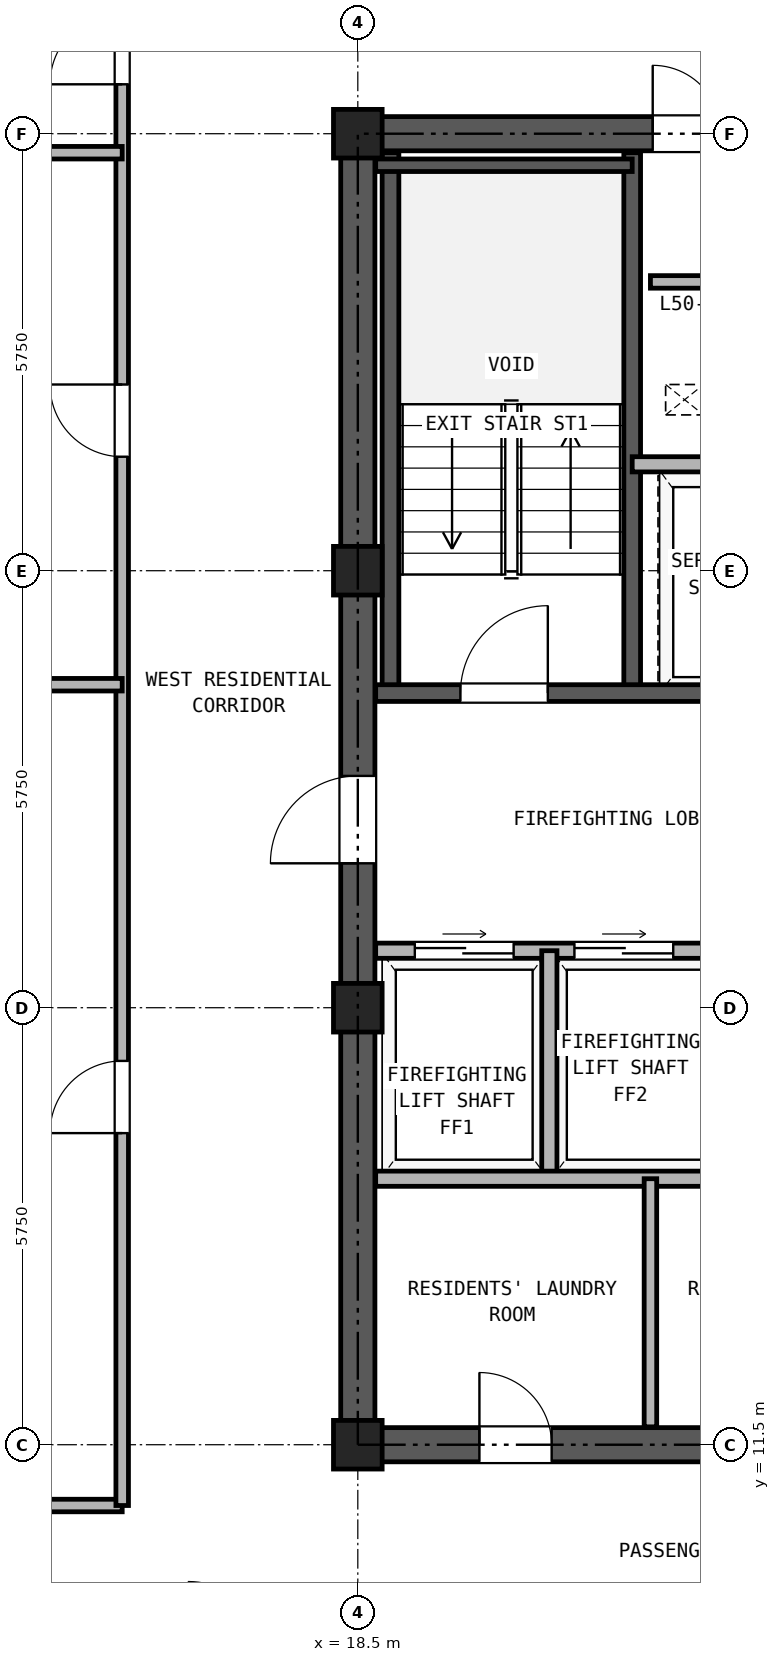
"""IFC4 building model, lengths in metres.
Left out: names, types, materials, properties, quantities, classifications, styles, units other than length and angle.
Written with IfcOpenShell. Run it as: python <this file> out.ifc"""

import sys

from ifc_helpers import new_model, si_unit, direction, frame, frame_2d, origin, origin_2d, place, context, subcontext, project, spatial, rectangle, hollow_rectangle, extrude, source, transform, mapped, element, fill, save


model = new_model("IFC4")
c1 = context("Model", 3, precision=1e-05, world=origin(), true_north=direction((0.0, 1.0)))
c2 = subcontext(c1, "Body", "Model", "MODEL_VIEW")
j1 = project(units=[si_unit("LENGTHUNIT", "METRE"), si_unit("PLANEANGLEUNIT", "RADIAN")], contexts=[c1])
p1 = place(None, origin())
s1 = spatial("IfcSite", under=j1, at=p1, CompositionType="ELEMENT")
p2 = place(p1, origin())
s2 = spatial("IfcBuilding", under=s1, at=p2, CompositionType="ELEMENT")
p3 = place(p2, frame((0.0, 0.0, 178.5)))
s3 = spatial("IfcBuildingStorey", under=s2, at=p3, CompositionType="ELEMENT", Elevation=178.5)
m1 = source(origin(), c2, "Body", "SweptSolid", [
    extrude(hollow_rectangle(XDim=0.64, YDim=0.64, WallThickness=0.035, at=origin_2d()), origin(), (0.0, 0.0, 1.0), 2.95),
])
for number, where, z_axis, x_axis in (
    (1, (18.5, 11.5, 0.0), (0.0, 0.0, 1.0), (1.0, 0.0, 0.0)),
    (2, (18.5, 17.25, 0.0), (0.0, 0.0, 1.0), (1.0, 0.0, 0.0)),
    (3, (18.5, 23.0, 0.0), (0.0, 0.0, 1.0), (1.0, 0.0, 0.0)),
    (4, (18.5, 28.75, 0.0), (0.0, 0.0, 1.0), (1.0, 0.0, 0.0)),
):
    element("IfcColumn", number, at=place(p3, frame(where, z_axis=z_axis, x_axis=x_axis)), inside=s3, PredefinedType="COLUMN", context=c2, shape_type="MappedRepresentation", body=[
        mapped(m1, transform((0.0, 0.0, 0.0), x_axis=(1.0, 0.0, 0.0), y_axis=(0.0, 1.0, 0.0), z_axis=(0.0, 0.0, 1.0), scale=1.0)),
    ])
p4 = place(p3, frame((18.275, 11.5, 0.0), z_axis=(0.0, 0.0, 1.0), x_axis=(1.0, 0.0, 0.0)))
e5 = element("IfcWall", 5, at=p4, inside=s3, PredefinedType="SHEAR", context=c2, shape_type="SweptSolid", body=[
    extrude(rectangle(XDim=10.45, YDim=0.45, at=frame_2d((5.225, 0.0))), origin(), (0.0, 0.0, 1.0), 2.95),
])
p5 = place(p4, frame((1.825, 0.0, 0.0)))
e6 = element("IfcOpeningElement", 6, at=p5, cuts=e5, PredefinedType="OPENING", context=c2, shape_type="SweptSolid", body=[
    extrude(rectangle(XDim=0.95, YDim=2.15, at=frame_2d((0.475, 1.075))), frame((0.0, 0.235, 0.0), z_axis=(0.0, -1.0, 0.0), x_axis=(1.0, 0.0, 0.0)), (0.0, 0.0, 1.0), 0.47),
])
p6 = place(p4, frame((5.325, 0.0, 0.0)))
e7 = element("IfcOpeningElement", 7, at=p6, cuts=e5, PredefinedType="OPENING", context=c2, shape_type="SweptSolid", body=[
    extrude(rectangle(XDim=0.95, YDim=2.15, at=frame_2d((0.475, 1.075))), frame((0.0, 0.235, 0.0), z_axis=(0.0, -1.0, 0.0), x_axis=(1.0, 0.0, 0.0)), (0.0, 0.0, 1.0), 0.47),
])
p7 = place(p4, frame((8.225, 0.0, 0.0)))
e8 = element("IfcOpeningElement", 8, at=p7, cuts=e5, PredefinedType="OPENING", context=c2, shape_type="SweptSolid", body=[
    extrude(rectangle(XDim=1.1, YDim=2.25, at=frame_2d((0.55, 1.125))), frame((0.0, 0.235, 0.0), z_axis=(0.0, -1.0, 0.0), x_axis=(1.0, 0.0, 0.0)), (0.0, 0.0, 1.0), 0.47),
])
p8 = place(p3, frame((18.275, 28.75, 0.0), z_axis=(0.0, 0.0, 1.0), x_axis=(1.0, 0.0, 0.0)))
e9 = element("IfcWall", 9, at=p8, inside=s3, PredefinedType="SHEAR", context=c2, shape_type="SweptSolid", body=[
    extrude(rectangle(XDim=10.45, YDim=0.45, at=frame_2d((5.225, 0.0))), origin(), (0.0, 0.0, 1.0), 2.95),
])
p9 = place(p8, frame((4.105, 0.0, 0.0)))
e10 = element("IfcOpeningElement", 10, at=p9, cuts=e9, PredefinedType="OPENING", context=c2, shape_type="SweptSolid", body=[
    extrude(rectangle(XDim=0.9, YDim=2.05, at=frame_2d((0.45, 1.025))), frame((0.0, 0.235, 0.0), z_axis=(0.0, -1.0, 0.0), x_axis=(1.0, 0.0, 0.0)), (0.0, 0.0, 1.0), 0.47),
])
p10 = place(p8, frame((5.645, 0.0, 0.0)))
e11 = element("IfcOpeningElement", 11, at=p10, cuts=e9, PredefinedType="OPENING", context=c2, shape_type="SweptSolid", body=[
    extrude(rectangle(XDim=0.9, YDim=2.05, at=frame_2d((0.45, 1.025))), frame((0.0, 0.235, 0.0), z_axis=(0.0, -1.0, 0.0), x_axis=(1.0, 0.0, 0.0)), (0.0, 0.0, 1.0), 0.47),
])
p11 = place(p3, frame((18.5, 11.725, 0.0), z_axis=(0.0, 0.0, 1.0), x_axis=(0.0, 1.0, 0.0)))
e12 = element("IfcWall", 12, at=p11, inside=s3, PredefinedType="SHEAR", context=c2, shape_type="SweptSolid", body=[
    extrude(rectangle(XDim=16.8, YDim=0.45, at=frame_2d((8.4, 0.0))), origin(), (0.0, 0.0, 1.0), 2.95),
])
p12 = place(p11, frame((7.425, 0.0, 0.0)))
e13 = element("IfcOpeningElement", 13, at=p12, cuts=e12, PredefinedType="OPENING", context=c2, shape_type="SweptSolid", body=[
    extrude(rectangle(XDim=1.15, YDim=2.2, at=frame_2d((0.575, 1.1))), frame((0.0, 0.235, 0.0), z_axis=(0.0, -1.0, 0.0), x_axis=(1.0, 0.0, 0.0)), (0.0, 0.0, 1.0), 0.47),
])
for number, where, z_axis, x_axis in (
    (14, (18.93, 21.39, 0.0), (0.0, 0.0, 1.0), (0.0, 1.0, 0.0)),
    (15, (22.11, 21.39, 0.0), (0.0, 0.0, 1.0), (0.0, 1.0, 0.0)),
):
    element("IfcWall", number, at=place(p3, frame(where, z_axis=z_axis, x_axis=x_axis)), inside=s3, PredefinedType="SOLIDWALL", context=c2, shape_type="SweptSolid", body=[
        extrude(rectangle(XDim=7.11, YDim=0.22, at=frame_2d((3.555, 0.0))), origin(), (0.0, 0.0, 1.0), 2.95),
    ])
p13 = place(p3, frame((18.735, 28.335, 0.0), z_axis=(0.0, 0.0, 1.0), x_axis=(1.0, 0.0, 0.0)))
e16 = element("IfcWall", 16, at=p13, inside=s3, PredefinedType="PARTITIONING", context=c2, shape_type="SweptSolid", body=[
    extrude(rectangle(XDim=3.375, YDim=0.165, at=frame_2d((1.688, 0.0))), origin(), (0.0, 0.0, 1.0), 2.95),
])
p14 = place(p3, frame((18.735, 21.39, 0.0), z_axis=(0.0, 0.0, 1.0), x_axis=(1.0, 0.0, 0.0)))
e17 = element("IfcWall", 17, at=p14, inside=s3, PredefinedType="SOLIDWALL", context=c2, shape_type="SweptSolid", body=[
    extrude(rectangle(XDim=6.395, YDim=0.22, at=frame_2d((3.197, 0.0))), origin(), (0.0, 0.0, 1.0), 2.95),
])
p15 = place(p14, frame((1.115, 0.0, 0.0)))
e18 = element("IfcOpeningElement", 18, at=p15, cuts=e17, PredefinedType="OPENING", context=c2, shape_type="SweptSolid", body=[
    extrude(rectangle(XDim=1.15, YDim=2.2, at=frame_2d((0.575, 1.1))), frame((0.0, 0.12, 0.0), z_axis=(0.0, -1.0, 0.0), x_axis=(1.0, 0.0, 0.0)), (0.0, 0.0, 1.0), 0.24),
])
p16 = place(p14, frame((4.845, 0.0, 0.0)))
e19 = element("IfcOpeningElement", 19, at=p16, cuts=e17, PredefinedType="OPENING", context=c2, shape_type="SweptSolid", body=[
    extrude(rectangle(XDim=1.1, YDim=2.25, at=frame_2d((0.55, 1.125))), frame((0.0, 0.12, 0.0), z_axis=(0.0, -1.0, 0.0), x_axis=(1.0, 0.0, 0.0)), (0.0, 0.0, 1.0), 0.24),
])
p17 = place(p3, frame((22.11, 24.4, 0.0), z_axis=(0.0, 0.0, 1.0), x_axis=(1.0, 0.0, 0.0)))
e20 = element("IfcWall", 20, at=p17, inside=s3, PredefinedType="PARTITIONING", context=c2, shape_type="SweptSolid", body=[
    extrude(rectangle(XDim=3.02, YDim=0.2, at=frame_2d((1.51, 0.0))), origin(), (0.0, 0.0, 1.0), 2.95),
])
p18 = place(p3, frame((18.735, 18.0, 0.0), z_axis=(0.0, 0.0, 1.0), x_axis=(1.0, 0.0, 0.0)))
e21 = element("IfcWall", 21, at=p18, inside=s3, PredefinedType="PARTITIONING", context=c2, shape_type="SweptSolid", body=[
    extrude(rectangle(XDim=9.53, YDim=0.2, at=frame_2d((4.765, 0.0))), origin(), (0.0, 0.0, 1.0), 2.95),
])
p19 = place(p18, frame((0.515, 0.0, 0.0)))
e22 = element("IfcOpeningElement", 22, at=p19, cuts=e21, PredefinedType="OPENING", context=c2, shape_type="SweptSolid", body=[
    extrude(rectangle(XDim=1.3, YDim=2.3, at=frame_2d((0.65, 1.15))), frame((0.0, 0.11, 0.0), z_axis=(0.0, -1.0, 0.0), x_axis=(1.0, 0.0, 0.0)), (0.0, 0.0, 1.0), 0.22),
])
p20 = place(p18, frame((2.615, 0.0, 0.0)))
e23 = element("IfcOpeningElement", 23, at=p20, cuts=e21, PredefinedType="OPENING", context=c2, shape_type="SweptSolid", body=[
    extrude(rectangle(XDim=1.3, YDim=2.3, at=frame_2d((0.65, 1.15))), frame((0.0, 0.11, 0.0), z_axis=(0.0, -1.0, 0.0), x_axis=(1.0, 0.0, 0.0)), (0.0, 0.0, 1.0), 0.22),
])
p21 = place(p18, frame((5.015, 0.0, 0.0)))
e24 = element("IfcOpeningElement", 24, at=p21, cuts=e21, PredefinedType="OPENING", context=c2, shape_type="SweptSolid", body=[
    extrude(rectangle(XDim=0.9, YDim=2.05, at=frame_2d((0.45, 1.025))), frame((0.0, 0.11, 0.0), z_axis=(0.0, -1.0, 0.0), x_axis=(1.0, 0.0, 0.0)), (0.0, 0.0, 1.0), 0.22),
])
p22 = place(p18, frame((7.715, 0.0, 0.0)))
e25 = element("IfcOpeningElement", 25, at=p22, cuts=e21, PredefinedType="OPENING", context=c2, shape_type="SweptSolid", body=[
    extrude(rectangle(XDim=0.9, YDim=2.05, at=frame_2d((0.45, 1.025))), frame((0.0, 0.11, 0.0), z_axis=(0.0, -1.0, 0.0), x_axis=(1.0, 0.0, 0.0)), (0.0, 0.0, 1.0), 0.22),
])
p23 = place(p3, frame((21.02, 15.0, 0.0), z_axis=(0.0, 0.0, 1.0), x_axis=(0.0, 1.0, 0.0)))
e26 = element("IfcWall", 26, at=p23, inside=s3, PredefinedType="PARTITIONING", context=c2, shape_type="SweptSolid", body=[
    extrude(rectangle(XDim=3.0, YDim=0.2, at=frame_2d((1.5, 0.0))), origin(), (0.0, 0.0, 1.0), 2.95),
])
p24 = place(p3, frame((18.735, 15.0, 0.0), z_axis=(0.0, 0.0, 1.0), x_axis=(1.0, 0.0, 0.0)))
e27 = element("IfcWall", 27, at=p24, inside=s3, PredefinedType="PARTITIONING", context=c2, shape_type="SweptSolid", body=[
    extrude(rectangle(XDim=9.53, YDim=0.2, at=frame_2d((4.765, 0.0))), origin(), (0.0, 0.0, 1.0), 2.95),
])
p25 = place(p3, frame((22.35, 11.735, 0.0), z_axis=(0.0, 0.0, 1.0), x_axis=(0.0, 1.0, 0.0)))
e28 = element("IfcWall", 28, at=p25, inside=s3, PredefinedType="PARTITIONING", context=c2, shape_type="SweptSolid", body=[
    extrude(rectangle(XDim=3.265, YDim=0.165, at=frame_2d((1.632, 0.0))), origin(), (0.0, 0.0, 1.0), 2.95),
])
p26 = place(p3, frame((7.6, 10.7, 0.0), z_axis=(0.0, 0.0, 1.0), x_axis=(1.0, 0.0, 0.0)))
e29 = element("IfcWall", 29, at=p26, inside=s3, PredefinedType="PARTITIONING", context=c2, shape_type="SweptSolid", body=[
    extrude(rectangle(XDim=7.8, YDim=0.165, at=frame_2d((3.9, 0.0))), origin(), (0.0, 0.0, 1.0), 2.95),
])
p27 = place(p3, frame((15.4, 10.7, 0.0), z_axis=(0.0, 0.0, 1.0), x_axis=(0.0, 1.0, 0.0)))
e30 = element("IfcWall", 30, at=p27, inside=s3, PredefinedType="PARTITIONING", context=c2, shape_type="SweptSolid", body=[
    extrude(rectangle(XDim=24.44, YDim=0.165, at=frame_2d((12.22, 0.0))), origin(), (0.0, 0.0, 1.0), 2.95),
])
p28 = place(p27, frame((4.9, 0.0, 0.0)))
e31 = element("IfcOpeningElement", 31, at=p28, cuts=e30, PredefinedType="OPENING", context=c2, shape_type="SweptSolid", body=[
    extrude(rectangle(XDim=0.95, YDim=2.15, at=frame_2d((0.475, 1.075))), frame((0.0, 0.093, 0.0), z_axis=(0.0, -1.0, 0.0), x_axis=(1.0, 0.0, 0.0)), (0.0, 0.0, 1.0), 0.185),
])
p29 = place(p27, frame((13.8, 0.0, 0.0)))
e32 = element("IfcOpeningElement", 32, at=p29, cuts=e30, PredefinedType="OPENING", context=c2, shape_type="SweptSolid", body=[
    extrude(rectangle(XDim=0.95, YDim=2.15, at=frame_2d((0.475, 1.075))), frame((0.0, 0.093, 0.0), z_axis=(0.0, -1.0, 0.0), x_axis=(1.0, 0.0, 0.0)), (0.0, 0.0, 1.0), 0.185),
])
p30 = place(p27, frame((18.7, 0.0, 0.0)))
e33 = element("IfcOpeningElement", 33, at=p30, cuts=e30, PredefinedType="OPENING", context=c2, shape_type="SweptSolid", body=[
    extrude(rectangle(XDim=0.95, YDim=2.15, at=frame_2d((0.475, 1.075))), frame((0.0, 0.093, 0.0), z_axis=(0.0, -1.0, 0.0), x_axis=(1.0, 0.0, 0.0)), (0.0, 0.0, 1.0), 0.185),
])
p31 = place(p3, frame((0.16, 21.5, 0.0), z_axis=(0.0, 0.0, 1.0), x_axis=(1.0, 0.0, 0.0)))
e34 = element("IfcWall", 34, at=p31, inside=s3, PredefinedType="PARTITIONING", context=c2, shape_type="SweptSolid", body=[
    extrude(rectangle(XDim=15.24, YDim=0.165, at=frame_2d((7.62, 0.0))), origin(), (0.0, 0.0, 1.0), 2.95),
])
p32 = place(p3, frame((0.16, 28.5, 0.0), z_axis=(0.0, 0.0, 1.0), x_axis=(1.0, 0.0, 0.0)))
e35 = element("IfcWall", 35, at=p32, inside=s3, PredefinedType="PARTITIONING", context=c2, shape_type="SweptSolid", body=[
    extrude(rectangle(XDim=15.24, YDim=0.165, at=frame_2d((7.62, 0.0))), origin(), (0.0, 0.0, 1.0), 2.323),
])
p33 = place(p3, frame((22.35, 26.8, 0.0), z_axis=(0.0, 0.0, 1.0), x_axis=(1.0, 0.0, 0.0)))
e36 = element("IfcWall", 36, at=p33, inside=s3, PredefinedType="PARTITIONING", context=c2, shape_type="SweptSolid", body=[
    extrude(rectangle(XDim=1.1, YDim=0.165, at=frame_2d((0.55, 0.0))), origin(), (0.0, 0.0, 1.0), 2.95),
])
p34 = place(p15, frame((1.15, 0.0, 0.0), z_axis=(0.0, 0.0, 1.0), x_axis=(-1.0, 0.0, 0.0)))
e37 = element("IfcDoor", 37, at=p34, inside=s3, OperationType="SINGLE_SWING_RIGHT", PredefinedType="DOOR", context=c2, shape_type="SweptSolid", body=[
    extrude(rectangle(XDim=1.15, YDim=2.2, at=frame_2d((0.575, 1.1))), frame((0.0, 0.025, 0.0), z_axis=(0.0, -1.0, 0.0), x_axis=(1.0, 0.0, 0.0)), (0.0, 0.0, 1.0), 0.05),
])
fill(e18, e37)
p35 = place(p19, origin())
e38 = element("IfcDoor", 38, at=p35, inside=s3, OperationType="DOUBLE_DOOR_SLIDING", PredefinedType="DOOR", context=c2, shape_type="SweptSolid", body=[
    extrude(rectangle(XDim=1.3, YDim=2.3, at=frame_2d((0.65, 1.15))), frame((0.0, 0.025, 0.0), z_axis=(0.0, -1.0, 0.0), x_axis=(1.0, 0.0, 0.0)), (0.0, 0.0, 1.0), 0.05),
])
fill(e22, e38)
p36 = place(p20, origin())
e39 = element("IfcDoor", 39, at=p36, inside=s3, OperationType="DOUBLE_DOOR_SLIDING", PredefinedType="DOOR", context=c2, shape_type="SweptSolid", body=[
    extrude(rectangle(XDim=1.3, YDim=2.3, at=frame_2d((0.65, 1.15))), frame((0.0, 0.025, 0.0), z_axis=(0.0, -1.0, 0.0), x_axis=(1.0, 0.0, 0.0)), (0.0, 0.0, 1.0), 0.05),
])
fill(e23, e39)
p37 = place(p12, frame((1.15, 0.0, 0.0), z_axis=(0.0, 0.0, 1.0), x_axis=(-1.0, 0.0, 0.0)))
e40 = element("IfcDoor", 40, at=p37, inside=s3, OperationType="SINGLE_SWING_LEFT", PredefinedType="DOOR", context=c2, shape_type="SweptSolid", body=[
    extrude(rectangle(XDim=1.15, YDim=2.2, at=frame_2d((0.575, 1.1))), frame((0.0, 0.025, 0.0), z_axis=(0.0, -1.0, 0.0), x_axis=(1.0, 0.0, 0.0)), (0.0, 0.0, 1.0), 0.05),
])
fill(e13, e40)
p38 = place(p9, origin())
e41 = element("IfcDoor", 41, at=p38, inside=s3, OperationType="SINGLE_SWING_LEFT", PredefinedType="DOOR", context=c2, shape_type="SweptSolid", body=[
    extrude(rectangle(XDim=0.9, YDim=2.05, at=frame_2d((0.45, 1.025))), frame((0.0, 0.025, 0.0), z_axis=(0.0, -1.0, 0.0), x_axis=(1.0, 0.0, 0.0)), (0.0, 0.0, 1.0), 0.05),
])
fill(e10, e41)
p39 = place(p5, frame((0.95, 0.0, 0.0), z_axis=(0.0, 0.0, 1.0), x_axis=(-1.0, 0.0, 0.0)))
e42 = element("IfcDoor", 42, at=p39, inside=s3, OperationType="SINGLE_SWING_LEFT", PredefinedType="DOOR", context=c2, shape_type="SweptSolid", body=[
    extrude(rectangle(XDim=0.95, YDim=2.15, at=frame_2d((0.475, 1.075))), frame((0.0, 0.025, 0.0), z_axis=(0.0, -1.0, 0.0), x_axis=(1.0, 0.0, 0.0)), (0.0, 0.0, 1.0), 0.05),
])
fill(e6, e42)
p40 = place(p28, frame((0.95, 0.0, 0.0), z_axis=(0.0, 0.0, 1.0), x_axis=(-1.0, 0.0, 0.0)))
e43 = element("IfcDoor", 43, at=p40, inside=s3, OperationType="SINGLE_SWING_LEFT", PredefinedType="DOOR", context=c2, shape_type="SweptSolid", body=[
    extrude(rectangle(XDim=0.95, YDim=2.15, at=frame_2d((0.475, 1.075))), frame((0.0, 0.025, 0.0), z_axis=(0.0, -1.0, 0.0), x_axis=(1.0, 0.0, 0.0)), (0.0, 0.0, 1.0), 0.05),
])
fill(e31, e43)
p41 = place(p29, frame((0.95, 0.0, 0.0), z_axis=(0.0, 0.0, 1.0), x_axis=(-1.0, 0.0, 0.0)))
e44 = element("IfcDoor", 44, at=p41, inside=s3, OperationType="SINGLE_SWING_RIGHT", PredefinedType="DOOR", context=c2, shape_type="SweptSolid", body=[
    extrude(rectangle(XDim=0.95, YDim=2.15, at=frame_2d((0.475, 1.075))), frame((0.0, 0.025, 0.0), z_axis=(0.0, -1.0, 0.0), x_axis=(1.0, 0.0, 0.0)), (0.0, 0.0, 1.0), 0.05),
])
fill(e32, e44)
p42 = place(p30, frame((0.95, 0.0, 0.0), z_axis=(0.0, 0.0, 1.0), x_axis=(-1.0, 0.0, 0.0)))
e45 = element("IfcDoor", 45, at=p42, inside=s3, OperationType="SINGLE_SWING_LEFT", PredefinedType="DOOR", context=c2, shape_type="SweptSolid", body=[
    extrude(rectangle(XDim=0.95, YDim=2.15, at=frame_2d((0.475, 1.075))), frame((0.0, 0.025, 0.0), z_axis=(0.0, -1.0, 0.0), x_axis=(1.0, 0.0, 0.0)), (0.0, 0.0, 1.0), 0.05),
])
fill(e33, e45)
save(model, sys.argv[1])
